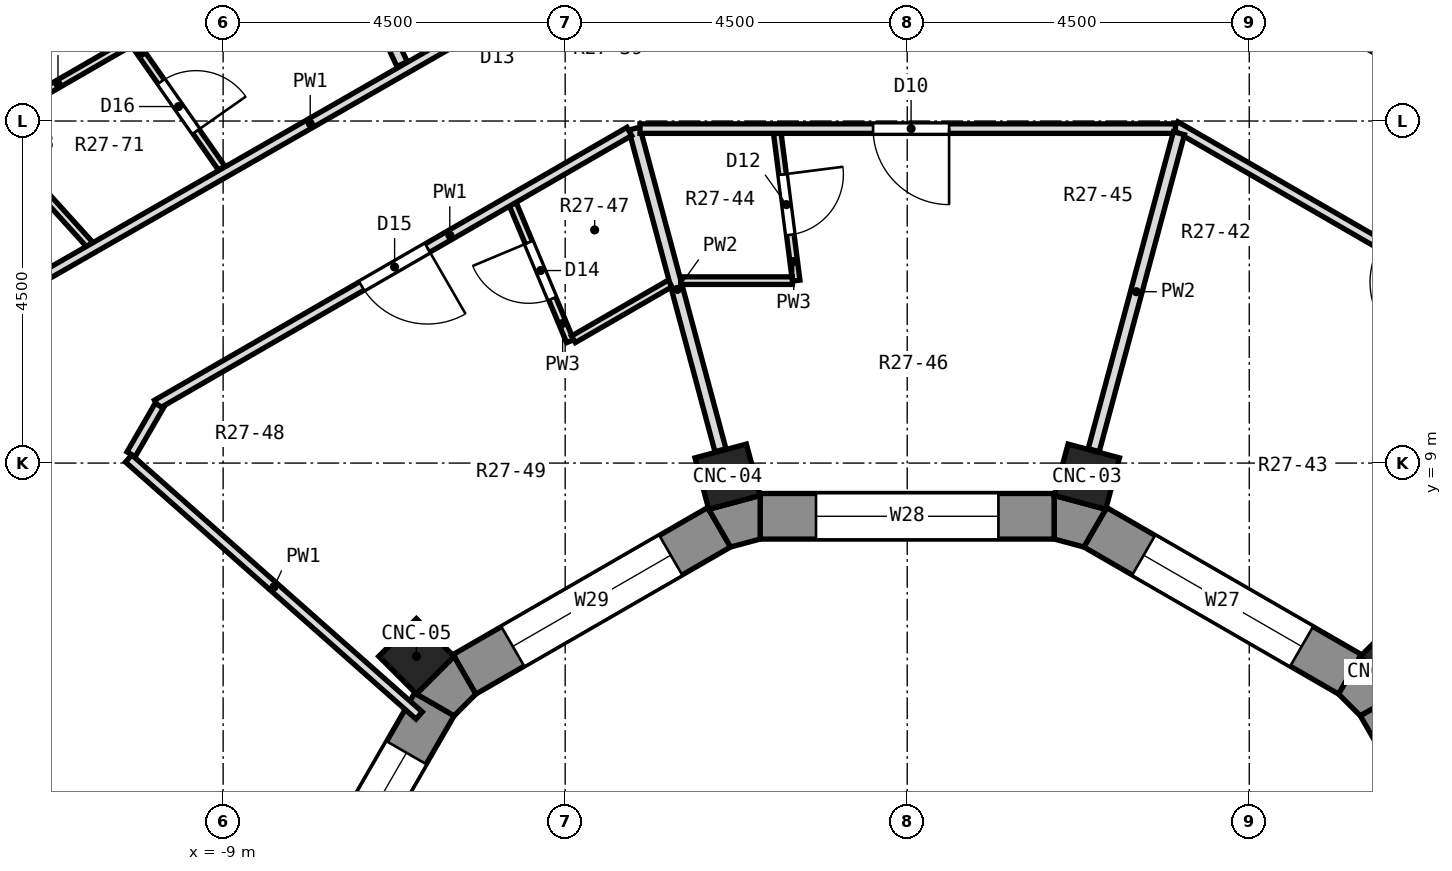
"""IFC4 building model, lengths in metres.
Left out: names, types, materials, properties, quantities, classifications, styles, units other than length and angle.
Written with IfcOpenShell. Run it as: python <this file> out.ifc"""

import sys

from ifc_helpers import new_model, si_unit, direction, frame, frame_2d, origin, origin_2d, place, context, subcontext, project, spatial, polyline, rectangle, outline, extrude, element, fill, save


model = new_model("IFC4")
c1 = context("Model", 3, precision=1e-05, world=origin(), true_north=direction((0.0, 1.0)))
c2 = subcontext(c1, "Body", "Model", "MODEL_VIEW")
j1 = project(units=[si_unit("LENGTHUNIT", "METRE"), si_unit("PLANEANGLEUNIT", "RADIAN")], contexts=[c1])
p1 = place(None, origin())
s1 = spatial("IfcSite", under=j1, at=p1, CompositionType="ELEMENT")
p2 = place(p1, origin())
s2 = spatial("IfcBuilding", under=s1, at=p2, CompositionType="ELEMENT")
p3 = place(p2, frame((0.0, 0.0, 180.6)))
s3 = spatial("IfcBuildingStorey", under=s2, at=p3, CompositionType="ELEMENT", Elevation=180.6)
for number, where, z_axis, x_axis in (
    (1, (6.458, 6.458, 0.0), (0.0, 0.0, 1.0), (0.707, 0.707, 0.0)),
    (2, (2.364, 8.821, 0.0), (0.0, 0.0, 1.0), (0.259, 0.966, 0.0)),
    (3, (-2.364, 8.821, 0.0), (0.0, 0.0, 1.0), (-0.259, 0.966, 0.0)),
    (4, (-6.458, 6.458, 0.0), (0.0, 0.0, 1.0), (-0.707, 0.707, 0.0)),
):
    element("IfcColumn", number, at=place(p3, frame(where, z_axis=z_axis, x_axis=x_axis)), inside=s3, PredefinedType="COLUMN", context=c2, shape_type="SweptSolid", body=[
        extrude(rectangle(XDim=0.7, YDim=0.7, at=origin_2d()), origin(), (0.0, 0.0, 1.0), 3.3),
    ])
p4 = place(p3, frame((8.156, 2.474, 0.0), z_axis=(0.0, 0.0, 1.0), x_axis=(-0.500033728941, 0.866005929495, 0.0)))
e5 = element("IfcWall", 5, at=p4, inside=s3, PredefinedType="SOLIDWALL", context=c2, shape_type="SweptSolid", body=[
    extrude(rectangle(XDim=3.87, YDim=0.6, at=frame_2d((1.935, 0.0))), origin(), (0.0, 0.0, 1.0), 2.85),
])
p5 = place(p4, frame((0.735, 0.0, 0.9)))
e6 = element("IfcOpeningElement", 6, at=p5, cuts=e5, PredefinedType="OPENING", context=c2, shape_type="SweptSolid", body=[
    extrude(rectangle(XDim=2.4, YDim=1.8, at=frame_2d((1.2, 0.9))), frame((0.0, 0.312, 0.0), z_axis=(0.0, -1.0, 0.0), x_axis=(1.0, 0.0, 0.0)), (0.0, 0.0, 1.0), 0.624),
])
p6 = place(p3, frame((5.826, 6.22, 0.0), z_axis=(0.0, 0.0, 1.0), x_axis=(-0.866005929495, 0.500033728941, 0.0)))
e7 = element("IfcWall", 7, at=p6, inside=s3, PredefinedType="SOLIDWALL", context=c2, shape_type="SweptSolid", body=[
    extrude(rectangle(XDim=3.87, YDim=0.6, at=frame_2d((1.935, 0.0))), origin(), (0.0, 0.0, 1.0), 2.85),
])
p7 = place(p6, frame((0.735, 0.0, 0.9)))
e8 = element("IfcOpeningElement", 8, at=p7, cuts=e7, PredefinedType="OPENING", context=c2, shape_type="SweptSolid", body=[
    extrude(rectangle(XDim=2.4, YDim=1.8, at=frame_2d((1.2, 0.9))), frame((0.0, 0.312, 0.0), z_axis=(0.0, -1.0, 0.0), x_axis=(1.0, 0.0, 0.0)), (0.0, 0.0, 1.0), 0.624),
])
p8 = place(p3, frame((1.935, 8.3, 0.0), z_axis=(0.0, 0.0, 1.0), x_axis=(-1.0, 0.0, 0.0)))
e9 = element("IfcWall", 9, at=p8, inside=s3, PredefinedType="SOLIDWALL", context=c2, shape_type="SweptSolid", body=[
    extrude(rectangle(XDim=3.87, YDim=0.6, at=frame_2d((1.935, 0.0))), origin(), (0.0, 0.0, 1.0), 2.85),
])
p9 = place(p8, frame((0.735, 0.0, 0.9)))
e10 = element("IfcOpeningElement", 10, at=p9, cuts=e9, PredefinedType="OPENING", context=c2, shape_type="SweptSolid", body=[
    extrude(rectangle(XDim=2.4, YDim=1.8, at=frame_2d((1.2, 0.9))), frame((0.0, 0.312, 0.0), z_axis=(0.0, -1.0, 0.0), x_axis=(1.0, 0.0, 0.0)), (0.0, 0.0, 1.0), 0.624),
])
p10 = place(p3, frame((-2.474, 8.156, 0.0), z_axis=(0.0, 0.0, 1.0), x_axis=(-0.866005929495, -0.500033728941, 0.0)))
e11 = element("IfcWall", 11, at=p10, inside=s3, PredefinedType="SOLIDWALL", context=c2, shape_type="SweptSolid", body=[
    extrude(rectangle(XDim=3.87, YDim=0.6, at=frame_2d((1.935, 0.0))), origin(), (0.0, 0.0, 1.0), 2.85),
])
p11 = place(p10, frame((0.735, 0.0, 0.9)))
e12 = element("IfcOpeningElement", 12, at=p11, cuts=e11, PredefinedType="OPENING", context=c2, shape_type="SweptSolid", body=[
    extrude(rectangle(XDim=2.4, YDim=1.8, at=frame_2d((1.2, 0.9))), frame((0.0, 0.312, 0.0), z_axis=(0.0, -1.0, 0.0), x_axis=(1.0, 0.0, 0.0)), (0.0, 0.0, 1.0), 0.624),
])
p12 = place(p3, frame((-6.22, 5.826, 0.0), z_axis=(0.0, 0.0, 1.0), x_axis=(-0.500033728941, -0.866005929495, 0.0)))
e13 = element("IfcWall", 13, at=p12, inside=s3, PredefinedType="SOLIDWALL", context=c2, shape_type="SweptSolid", body=[
    extrude(rectangle(XDim=3.87, YDim=0.6, at=frame_2d((1.935, 0.0))), origin(), (0.0, 0.0, 1.0), 2.85),
])
p13 = place(p12, frame((0.735, 0.0, 0.9)))
e14 = element("IfcOpeningElement", 14, at=p13, cuts=e13, PredefinedType="OPENING", context=c2, shape_type="SweptSolid", body=[
    extrude(rectangle(XDim=2.4, YDim=1.8, at=frame_2d((1.2, 0.9))), frame((0.0, 0.312, 0.0), z_axis=(0.0, -1.0, 0.0), x_axis=(1.0, 0.0, 0.0)), (0.0, 0.0, 1.0), 0.624),
])
p14 = place(p3, origin())
e15 = element("IfcWall", 15, at=p14, inside=s3, PredefinedType="SOLIDWALL", context=c2, shape_type="SweptSolid", body=[
    extrude(outline(polyline([(5.962, 6.458), (5.676, 5.961), (5.961, 5.676), (6.458, 5.962), (5.962, 6.458)])), origin(), (0.0, 0.0, 1.0), 2.85),
])
p15 = place(p3, origin())
e16 = element("IfcWall", 16, at=p15, inside=s3, PredefinedType="SOLIDWALL", context=c2, shape_type="SweptSolid", body=[
    extrude(outline(polyline([(1.935, 8.573), (1.935, 8.0), (2.324, 7.896), (2.611, 8.392), (1.935, 8.573)])), origin(), (0.0, 0.0, 1.0), 2.85),
])
p16 = place(p3, origin())
e17 = element("IfcWall", 17, at=p16, inside=s3, PredefinedType="SOLIDWALL", context=c2, shape_type="SweptSolid", body=[
    extrude(outline(polyline([(-1.935, 8.0), (-1.935, 8.573), (-2.611, 8.392), (-2.324, 7.896), (-1.935, 8.0)])), origin(), (0.0, 0.0, 1.0), 2.85),
])
p17 = place(p3, origin())
e18 = element("IfcWall", 18, at=p17, inside=s3, PredefinedType="SOLIDWALL", context=c2, shape_type="SweptSolid", body=[
    extrude(outline(polyline([(-6.458, 5.962), (-5.961, 5.676), (-5.676, 5.961), (-5.962, 6.458), (-6.458, 5.962)])), origin(), (0.0, 0.0, 1.0), 2.85),
])
p18 = place(p3, frame((-1.709, 13.338, 0.0), z_axis=(0.0, 0.0, 1.0), x_axis=(0.126956267131, -0.991908315439, 0.0)))
e19 = element("IfcWall", 19, at=p18, inside=s3, PredefinedType="PARTITIONING", context=c2, shape_type="SweptSolid", body=[
    extrude(rectangle(XDim=1.954, YDim=0.1, at=frame_2d((0.977, 0.0))), origin(), (0.0, 0.0, 1.0), 2.85),
])
p19 = place(p18, frame((0.546, 0.0, 0.0)))
e20 = element("IfcOpeningElement", 20, at=p19, cuts=e19, PredefinedType="OPENING", context=c2, shape_type="SweptSolid", body=[
    extrude(rectangle(XDim=0.8, YDim=2.1, at=frame_2d((0.4, 1.05))), frame((0.0, 0.062, 0.0), z_axis=(0.0, -1.0, 0.0), x_axis=(1.0, 0.0, 0.0)), (0.0, 0.0, 1.0), 0.124),
])
p20 = place(p3, frame((-3.591, 13.4, 0.0), z_axis=(0.0, 0.0, 1.0), x_axis=(0.25888001656, -0.965909486974, 0.0)))
e21 = element("IfcWall", 21, at=p20, inside=s3, PredefinedType="PARTITIONING", context=c2, shape_type="SweptSolid", body=[
    extrude(rectangle(XDim=4.381, YDim=0.15, at=frame_2d((2.19, 0.0))), origin(), (0.0, 0.0, 1.0), 2.85),
])
p21 = place(p3, frame((-5.189, 12.405, 0.0), z_axis=(0.0, 0.0, 1.0), x_axis=(0.385910563531, -0.922536198182, 0.0)))
e22 = element("IfcWall", 22, at=p21, inside=s3, PredefinedType="PARTITIONING", context=c2, shape_type="SweptSolid", body=[
    extrude(rectangle(XDim=1.954, YDim=0.1, at=frame_2d((0.977, 0.0))), origin(), (0.0, 0.0, 1.0), 2.85),
])
p22 = place(p21, frame((0.546, 0.0, 0.0)))
e23 = element("IfcOpeningElement", 23, at=p22, cuts=e22, PredefinedType="OPENING", context=c2, shape_type="SweptSolid", body=[
    extrude(rectangle(XDim=0.8, YDim=2.1, at=frame_2d((0.4, 1.05))), frame((0.0, 0.062, 0.0), z_axis=(0.0, -1.0, 0.0), x_axis=(1.0, 0.0, 0.0)), (0.0, 0.0, 1.0), 0.124),
])
p23 = place(p3, frame((-10.031, 21.517, 0.0), z_axis=(0.0, 0.0, 1.0), x_axis=(0.422305280768, -0.906453666679, 0.0)))
e24 = element("IfcWall", 24, at=p23, inside=s3, PredefinedType="PARTITIONING", context=c2, shape_type="SweptSolid", body=[
    extrude(rectangle(XDim=8.018, YDim=0.15, at=frame_2d((4.009, 0.0))), origin(), (0.0, 0.0, 1.0), 2.85),
])
p24 = place(p3, frame((-10.191, 14.554, 0.0), z_axis=(0.0, 0.0, 1.0), x_axis=(0.573534545192, -0.819181375198, 0.0)))
e25 = element("IfcWall", 25, at=p24, inside=s3, PredefinedType="PARTITIONING", context=c2, shape_type="SweptSolid", body=[
    extrude(rectangle(XDim=2.042, YDim=0.1, at=frame_2d((1.021, 0.0))), origin(), (0.0, 0.0, 1.0), 2.85),
])
p25 = place(p24, frame((0.654, 0.0, 0.0)))
e26 = element("IfcOpeningElement", 26, at=p25, cuts=e25, PredefinedType="OPENING", context=c2, shape_type="SweptSolid", body=[
    extrude(rectangle(XDim=0.8, YDim=2.1, at=frame_2d((0.4, 1.05))), frame((0.0, 0.062, 0.0), z_axis=(0.0, -1.0, 0.0), x_axis=(1.0, 0.0, 0.0)), (0.0, 0.0, 1.0), 0.124),
])
p26 = place(p3, frame((-12.154, 13.421, 0.0), z_axis=(0.0, 0.0, 1.0), x_axis=(0.670986897281, -0.741469206156, 0.0)))
e27 = element("IfcWall", 27, at=p26, inside=s3, PredefinedType="PARTITIONING", context=c2, shape_type="SweptSolid", body=[
    extrude(rectangle(XDim=2.085, YDim=0.1, at=frame_2d((1.042, 0.0))), origin(), (0.0, 0.0, 1.0), 2.85),
])
p27 = place(p3, frame((-10.243, 9.06, 0.0), z_axis=(0.0, 0.0, 1.0), x_axis=(0.748988343692, -0.662583172903, 0.0)))
e28 = element("IfcWall", 28, at=p27, inside=s3, PredefinedType="PARTITIONING", context=c2, shape_type="SweptSolid", body=[
    extrude(rectangle(XDim=5.103, YDim=0.125, at=frame_2d((2.552, 0.0))), origin(), (0.0, 0.0, 1.0), 2.85),
])
p28 = place(p3, frame((3.529, 13.436, 0.0), z_axis=(0.0, 0.0, 1.0), x_axis=(0.865968995572, -0.500097689165, 0.0)))
e29 = element("IfcWall", 29, at=p28, inside=s3, PredefinedType="PARTITIONING", context=c2, shape_type="SweptSolid", body=[
    extrude(rectangle(XDim=7.19, YDim=0.125, at=frame_2d((3.595, 0.0))), origin(), (0.0, 0.0, 1.0), 2.85),
])
p29 = place(p28, frame((3.112, 0.0, 0.0)))
e30 = element("IfcOpeningElement", 30, at=p29, cuts=e29, PredefinedType="OPENING", context=c2, shape_type="SweptSolid", body=[
    extrude(rectangle(XDim=1.0, YDim=2.1, at=frame_2d((0.5, 1.05))), frame((0.0, 0.074, 0.0), z_axis=(0.0, -1.0, 0.0), x_axis=(1.0, 0.0, 0.0)), (0.0, 0.0, 1.0), 0.149),
])
p30 = place(p3, frame((4.117, 15.636, 0.0), z_axis=(0.0, 0.0, 1.0), x_axis=(0.866036031404, -0.49998159197, 0.0)))
e31 = element("IfcWall", 31, at=p30, inside=s3, PredefinedType="PARTITIONING", context=c2, shape_type="SweptSolid", body=[
    extrude(rectangle(XDim=3.724, YDim=0.125, at=frame_2d((1.862, 0.0))), origin(), (0.0, 0.0, 1.0), 2.85),
])
p31 = place(p3, frame((-2.98, 11.4, 0.0), z_axis=(0.0, 0.0, 1.0), x_axis=(1.0, 0.0, 0.0)))
e32 = element("IfcWall", 32, at=p31, inside=s3, PredefinedType="PARTITIONING", context=c2, shape_type="SweptSolid", body=[
    extrude(rectangle(XDim=1.469, YDim=0.1, at=frame_2d((0.734, 0.0))), origin(), (0.0, 0.0, 1.0), 2.85),
])
p32 = place(p3, frame((-3.516, 13.4, 0.0), z_axis=(0.0, 0.0, 1.0), x_axis=(1.0, 0.0, 0.0)))
e33 = element("IfcWall", 33, at=p32, inside=s3, PredefinedType="PARTITIONING", context=c2, shape_type="SweptSolid", body=[
    extrude(rectangle(XDim=7.045, YDim=0.125, at=frame_2d((3.522, 0.0))), origin(), (0.0, 0.0, 1.0), 2.85),
])
p33 = place(p32, frame((3.067, 0.0, 0.0)))
e34 = element("IfcOpeningElement", 34, at=p33, cuts=e33, PredefinedType="OPENING", context=c2, shape_type="SweptSolid", body=[
    extrude(rectangle(XDim=1.0, YDim=2.1, at=frame_2d((0.5, 1.05))), frame((0.0, 0.074, 0.0), z_axis=(0.0, -1.0, 0.0), x_axis=(1.0, 0.0, 0.0)), (0.0, 0.0, 1.0), 0.149),
])
p34 = place(p3, frame((-11.484, 11.385, 0.0), z_axis=(0.0, 0.0, 1.0), x_axis=(0.867331679026, 0.49773060842, 0.0)))
e35 = element("IfcWall", 35, at=p34, inside=s3, PredefinedType="PARTITIONING", context=c2, shape_type="SweptSolid", body=[
    extrude(rectangle(XDim=8.371, YDim=0.125, at=frame_2d((4.185, 0.0))), origin(), (0.0, 0.0, 1.0), 2.85),
])
p35 = place(p34, frame((6.575, 0.0, 0.0)))
e36 = element("IfcOpeningElement", 36, at=p35, cuts=e35, PredefinedType="OPENING", context=c2, shape_type="SweptSolid", body=[
    extrude(rectangle(XDim=0.9, YDim=2.1, at=frame_2d((0.45, 1.05))), frame((0.0, 0.074, 0.0), z_axis=(0.0, -1.0, 0.0), x_axis=(1.0, 0.0, 0.0)), (0.0, 0.0, 1.0), 0.149),
])
p36 = place(p3, frame((-4.392, 10.628, 0.0), z_axis=(0.0, 0.0, 1.0), x_axis=(0.865911474639, 0.500197279169, 0.0)))
e37 = element("IfcWall", 37, at=p36, inside=s3, PredefinedType="PARTITIONING", context=c2, shape_type="SweptSolid", body=[
    extrude(rectangle(XDim=1.469, YDim=0.1, at=frame_2d((0.734, 0.0))), origin(), (0.0, 0.0, 1.0), 2.85),
])
p37 = place(p3, frame((-9.871, 9.773, 0.0), z_axis=(0.0, 0.0, 1.0), x_axis=(0.865954448031, 0.500122878836, 0.0)))
e38 = element("IfcWall", 38, at=p37, inside=s3, PredefinedType="PARTITIONING", context=c2, shape_type="SweptSolid", body=[
    extrude(rectangle(XDim=7.177, YDim=0.125, at=frame_2d((3.589, 0.0))), origin(), (0.0, 0.0, 1.0), 2.85),
])
p38 = place(p37, frame((3.112, 0.0, 0.0)))
e39 = element("IfcOpeningElement", 39, at=p38, cuts=e38, PredefinedType="OPENING", context=c2, shape_type="SweptSolid", body=[
    extrude(rectangle(XDim=1.0, YDim=2.1, at=frame_2d((0.5, 1.05))), frame((0.0, 0.074, 0.0), z_axis=(0.0, -1.0, 0.0), x_axis=(1.0, 0.0, 0.0)), (0.0, 0.0, 1.0), 0.149),
])
p39 = place(p3, frame((-12.11, 13.446, 0.0), z_axis=(0.0, 0.0, 1.0), x_axis=(0.865956302405, 0.500119668004, 0.0)))
e40 = element("IfcWall", 40, at=p39, inside=s3, PredefinedType="PARTITIONING", context=c2, shape_type="SweptSolid", body=[
    extrude(rectangle(XDim=2.164, YDim=0.1, at=frame_2d((1.082, 0.0))), origin(), (0.0, 0.0, 1.0), 2.85),
])
p40 = place(p3, frame((-12.842, 14.425, 0.0), z_axis=(0.0, 0.0, 1.0), x_axis=(0.766089344118, 0.642734094964, 0.0)))
e41 = element("IfcWall", 41, at=p40, inside=s3, PredefinedType="PARTITIONING", context=c2, shape_type="SweptSolid", body=[
    extrude(rectangle(XDim=2.201, YDim=0.1, at=frame_2d((1.101, 0.0))), origin(), (0.0, 0.0, 1.0), 2.85),
])
p41 = place(p3, frame((-10.21, 9.115, 0.0), z_axis=(0.0, 0.0, 1.0), x_axis=(0.500827895298, 0.86554689029, 0.0)))
e42 = element("IfcWall", 42, at=p41, inside=s3, PredefinedType="PARTITIONING", context=c2, shape_type="SweptSolid", body=[
    extrude(rectangle(XDim=0.739, YDim=0.125, at=frame_2d((0.37, 0.0))), origin(), (0.0, 0.0, 1.0), 2.85),
])
p42 = place(p3, frame((2.454, 9.17, 0.0), z_axis=(0.0, 0.0, 1.0), x_axis=(0.259632812034, 0.965707410614, 0.0)))
e43 = element("IfcWall", 43, at=p42, inside=s3, PredefinedType="PARTITIONING", context=c2, shape_type="SweptSolid", body=[
    extrude(rectangle(XDim=4.318, YDim=0.15, at=frame_2d((2.159, 0.0))), origin(), (0.0, 0.0, 1.0), 2.85),
])
p43 = place(p7, origin())
e44 = element("IfcWindow", 44, at=p43, inside=s3, PartitioningType="SINGLE_PANEL", PredefinedType="WINDOW", context=c2, shape_type="SweptSolid", body=[
    extrude(rectangle(XDim=2.4, YDim=1.8, at=frame_2d((1.2, 0.9))), frame((0.0, -0.12, 0.0), z_axis=(0.0, -1.0, 0.0), x_axis=(1.0, 0.0, 0.0)), (0.0, 0.0, 1.0), 0.06),
])
fill(e8, e44)
p44 = place(p9, origin())
e45 = element("IfcWindow", 45, at=p44, inside=s3, PartitioningType="SINGLE_PANEL", PredefinedType="WINDOW", context=c2, shape_type="SweptSolid", body=[
    extrude(rectangle(XDim=2.4, YDim=1.8, at=frame_2d((1.2, 0.9))), frame((0.0, -0.12, 0.0), z_axis=(0.0, -1.0, 0.0), x_axis=(1.0, 0.0, 0.0)), (0.0, 0.0, 1.0), 0.06),
])
fill(e10, e45)
p45 = place(p11, origin())
e46 = element("IfcWindow", 46, at=p45, inside=s3, PartitioningType="SINGLE_PANEL", PredefinedType="WINDOW", context=c2, shape_type="SweptSolid", body=[
    extrude(rectangle(XDim=2.4, YDim=1.8, at=frame_2d((1.2, 0.9))), frame((0.0, -0.12, 0.0), z_axis=(0.0, -1.0, 0.0), x_axis=(1.0, 0.0, 0.0)), (0.0, 0.0, 1.0), 0.06),
])
fill(e12, e46)
p46 = place(p13, origin())
e47 = element("IfcWindow", 47, at=p46, inside=s3, PartitioningType="SINGLE_PANEL", PredefinedType="WINDOW", context=c2, shape_type="SweptSolid", body=[
    extrude(rectangle(XDim=2.4, YDim=1.8, at=frame_2d((1.2, 0.9))), frame((0.0, -0.12, 0.0), z_axis=(0.0, -1.0, 0.0), x_axis=(1.0, 0.0, 0.0)), (0.0, 0.0, 1.0), 0.06),
])
fill(e14, e47)
p47 = place(p33, frame((1.0, 0.0, 0.0), z_axis=(0.0, 0.0, 1.0), x_axis=(-1.0, 0.0, 0.0)))
e48 = element("IfcDoor", 48, at=p47, inside=s3, OperationType="SINGLE_SWING_LEFT", PredefinedType="DOOR", context=c2, shape_type="SweptSolid", body=[
    extrude(rectangle(XDim=1.0, YDim=2.1, at=frame_2d((0.5, 1.05))), frame((0.0, 0.025, 0.0), z_axis=(0.0, -1.0, 0.0), x_axis=(1.0, 0.0, 0.0)), (0.0, 0.0, 1.0), 0.05),
])
fill(e34, e48)
p48 = place(p19, origin())
e49 = element("IfcDoor", 49, at=p48, inside=s3, OperationType="SINGLE_SWING_LEFT", PredefinedType="DOOR", context=c2, shape_type="SweptSolid", body=[
    extrude(rectangle(XDim=0.8, YDim=2.1, at=frame_2d((0.4, 1.05))), frame((0.0, 0.025, 0.0), z_axis=(0.0, -1.0, 0.0), x_axis=(1.0, 0.0, 0.0)), (0.0, 0.0, 1.0), 0.05),
])
fill(e20, e49)
p49 = place(p22, frame((0.8, 0.0, 0.0), z_axis=(0.0, 0.0, 1.0), x_axis=(-1.0, 0.0, 0.0)))
e50 = element("IfcDoor", 50, at=p49, inside=s3, OperationType="SINGLE_SWING_RIGHT", PredefinedType="DOOR", context=c2, shape_type="SweptSolid", body=[
    extrude(rectangle(XDim=0.8, YDim=2.1, at=frame_2d((0.4, 1.05))), frame((0.0, 0.025, 0.0), z_axis=(0.0, -1.0, 0.0), x_axis=(1.0, 0.0, 0.0)), (0.0, 0.0, 1.0), 0.05),
])
fill(e23, e50)
p50 = place(p38, frame((1.0, 0.0, 0.0), z_axis=(0.0, 0.0, 1.0), x_axis=(-1.0, 0.0, 0.0)))
e51 = element("IfcDoor", 51, at=p50, inside=s3, OperationType="SINGLE_SWING_LEFT", PredefinedType="DOOR", context=c2, shape_type="SweptSolid", body=[
    extrude(rectangle(XDim=1.0, YDim=2.1, at=frame_2d((0.5, 1.05))), frame((0.0, 0.025, 0.0), z_axis=(0.0, -1.0, 0.0), x_axis=(1.0, 0.0, 0.0)), (0.0, 0.0, 1.0), 0.05),
])
fill(e39, e51)
p51 = place(p25, origin())
e52 = element("IfcDoor", 52, at=p51, inside=s3, OperationType="SINGLE_SWING_RIGHT", PredefinedType="DOOR", context=c2, shape_type="SweptSolid", body=[
    extrude(rectangle(XDim=0.8, YDim=2.1, at=frame_2d((0.4, 1.05))), frame((0.0, 0.025, 0.0), z_axis=(0.0, -1.0, 0.0), x_axis=(1.0, 0.0, 0.0)), (0.0, 0.0, 1.0), 0.05),
])
fill(e26, e52)
save(model, sys.argv[1])
